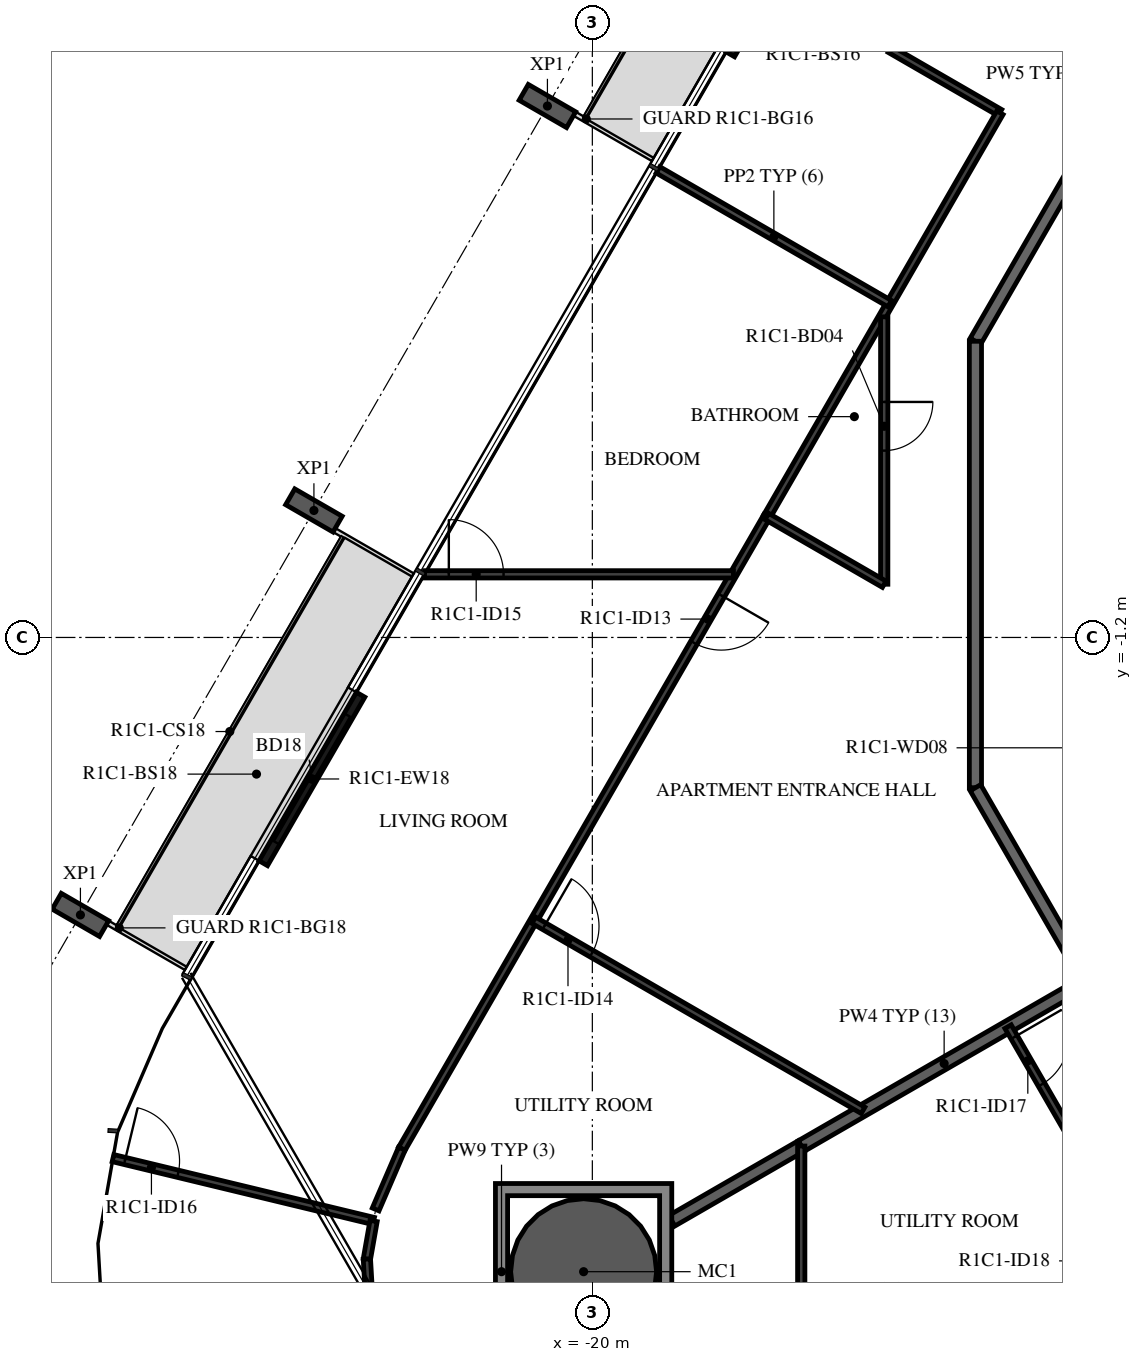
"""IFC4 building model, lengths in metres.
Left out: names, types, materials, properties, quantities, classifications, styles, units other than length and angle.
Written with IfcOpenShell. Run it as: python <this file> out.ifc"""

import sys

from ifc_helpers import new_model, si_unit, direction, frame, frame_2d, origin, origin_2d, place, context, subcontext, project, spatial, polyline, rectangle, hollow_circle, i_section, outline, extrude, element, fill, save


model = new_model("IFC4")
c1 = context("Model", 3, precision=1e-05, world=origin(), true_north=direction((0.0, 1.0)))
c2 = subcontext(c1, "Body", "Model", "MODEL_VIEW")
j1 = project(units=[si_unit("LENGTHUNIT", "METRE"), si_unit("PLANEANGLEUNIT", "RADIAN")], contexts=[c1])
p1 = place(None, origin())
s1 = spatial("IfcSite", under=j1, at=p1, CompositionType="ELEMENT")
p2 = place(p1, origin())
s2 = spatial("IfcBuilding", under=s1, at=p2, CompositionType="ELEMENT")
p3 = place(p2, frame((0.0, 0.0, 62.9)))
s3 = spatial("IfcBuildingStorey", under=s2, at=p3, CompositionType="ELEMENT", Elevation=62.9)
p4 = place(p3, frame((-20.144, -11.63, -0.38), z_axis=(0.0, 0.0, 1.0), x_axis=(1.0, 0.0, 0.0)))
e1 = element("IfcColumn", 1, at=p4, inside=s3, PredefinedType="COLUMN", context=c2, shape_type="SweptSolid", body=[
    extrude(hollow_circle(Radius=1.2, WallThickness=0.06, at=origin_2d()), origin(), (0.0, 0.0, 1.0), 3.5),
])
for number, where, z_axis, x_axis in (
    (2, (-20.739, 7.539, -0.38), (0.0, 0.0, 1.0), (0.5, 0.866, 0.0)),
    (3, (-24.579, 0.888, -0.38), (0.0, 0.0, 1.0), (0.5, 0.866, 0.0)),
    (4, (-28.419, -5.763, -0.38), (0.0, 0.0, 1.0), (0.5, 0.866, 0.0)),
):
    element("IfcColumn", number, at=place(p3, frame(where, z_axis=z_axis, x_axis=x_axis)), inside=s3, PredefinedType="COLUMN", context=c2, shape_type="SweptSolid", body=[
        extrude(i_section(OverallWidth=0.3, OverallDepth=0.9, WebThickness=0.019, FlangeThickness=0.035, FilletRadius=0.03, at=origin_2d()), origin(), (0.0, 0.0, 1.0), 3.5),
    ])
p5 = place(p3, frame((-16.131, 11.161, 0.0), z_axis=(0.0, 0.0, 1.0), x_axis=(-0.500028443584, -0.866008981251, 0.0)))
e5 = element("IfcWall", 5, at=p5, inside=s3, PredefinedType="STANDARD", context=c2, shape_type="SweptSolid", body=[
    extrude(rectangle(XDim=3.2, YDim=0.16, at=frame_2d((1.6, 0.0))), origin(), (0.0, 0.0, 1.0), 3.12),
])
p6 = place(p5, frame((0.4, 0.0, 0.0)))
e6 = element("IfcOpeningElement", 6, at=p6, cuts=e5, PredefinedType="OPENING", context=c2, shape_type="SweptSolid", body=[
    extrude(rectangle(XDim=2.4, YDim=2.4, at=frame_2d((1.2, 1.2))), frame((0.0, 0.09, 0.0), z_axis=(0.0, -1.0, 0.0), x_axis=(1.0, 0.0, 0.0)), (0.0, 0.0, 1.0), 0.18),
])
p7 = place(p3, frame((-23.811, -2.142, 0.0), z_axis=(0.0, 0.0, 1.0), x_axis=(-0.500028443584, -0.866008981251, 0.0)))
e7 = element("IfcWall", 7, at=p7, inside=s3, PredefinedType="STANDARD", context=c2, shape_type="SweptSolid", body=[
    extrude(rectangle(XDim=3.2, YDim=0.16, at=frame_2d((1.6, 0.0))), origin(), (0.0, 0.0, 1.0), 3.12),
])
p8 = place(p7, frame((0.4, 0.0, 0.0)))
e8 = element("IfcOpeningElement", 8, at=p8, cuts=e7, PredefinedType="OPENING", context=c2, shape_type="SweptSolid", body=[
    extrude(rectangle(XDim=2.4, YDim=2.4, at=frame_2d((1.2, 1.2))), frame((0.0, 0.09, 0.0), z_axis=(0.0, -1.0, 0.0), x_axis=(1.0, 0.0, 0.0)), (0.0, 0.0, 1.0), 0.18),
])
p9 = place(p3, frame((-10.029, 10.029, 0.0), z_axis=(0.0, 0.0, 1.0), x_axis=(-0.500001669485, -0.866024439905, 0.0)))
e9 = element("IfcWall", 9, at=p9, inside=s3, PredefinedType="STANDARD", context=c2, shape_type="SweptSolid", body=[
    extrude(rectangle(XDim=7.342, YDim=0.2, at=frame_2d((3.671, 0.0))), origin(), (0.0, 0.0, 1.0), 3.12),
])
p10 = place(p9, frame((0.2, 0.0, 0.0)))
e10 = element("IfcOpeningElement", 10, at=p10, cuts=e9, PredefinedType="OPENING", context=c2, shape_type="SweptSolid", body=[
    extrude(rectangle(XDim=1.0, YDim=2.1, at=frame_2d((0.5, 1.05))), frame((0.0, 0.11, 0.0), z_axis=(0.0, -1.0, 0.0), x_axis=(1.0, 0.0, 0.0)), (0.0, 0.0, 1.0), 0.22),
])
for number, where, z_axis, x_axis in (
    (11, (-13.7, 3.671, 0.0), (0.0, 0.0, 1.0), (0.0, -1.0, 0.0)),
    (12, (-13.7, -3.671, 0.0), (0.0, 0.0, 1.0), (0.5, -0.866, 0.0)),
):
    element("IfcWall", number, at=place(p3, frame(where, z_axis=z_axis, x_axis=x_axis)), inside=s3, PredefinedType="STANDARD", context=c2, shape_type="SweptSolid", body=[
        extrude(rectangle(XDim=7.342, YDim=0.2, at=frame_2d((3.671, 0.0))), origin(), (0.0, 0.0, 1.0), 3.12),
    ])
p11 = place(p3, frame((-16.565, -9.564, 0.0), z_axis=(0.0, 0.0, 1.0), x_axis=(0.866028274568, 0.499995027624, 0.0)))
e13 = element("IfcWall", 13, at=p11, inside=s3, PredefinedType="STANDARD", context=c2, shape_type="SweptSolid", body=[
    extrude(rectangle(XDim=5.427, YDim=0.2, at=frame_2d((2.714, 0.0))), origin(), (0.0, 0.0, 1.0), 3.12),
])
p12 = place(p3, frame((-18.694, -10.793, 0.0), z_axis=(0.0, 0.0, 1.0), x_axis=(0.866046662726, 0.499963176624, 0.0)))
e14 = element("IfcWall", 14, at=p12, inside=s3, PredefinedType="STANDARD", context=c2, shape_type="SweptSolid", body=[
    extrude(rectangle(XDim=2.458, YDim=0.2, at=frame_2d((1.229, 0.0))), origin(), (0.0, 0.0, 1.0), 3.12),
])
p13 = place(p3, frame((-15.106, 8.474, 0.0), z_axis=(0.0, 0.0, 1.0), x_axis=(0.866041603473, -0.499971940267, 0.0)))
e15 = element("IfcWall", 15, at=p13, inside=s3, PredefinedType="PARTITIONING", context=c2, shape_type="SweptSolid", body=[
    extrude(rectangle(XDim=2.089, YDim=0.12, at=frame_2d((1.045, 0.0))), origin(), (0.0, 0.0, 1.0), 3.12),
])
p14 = place(p3, frame((-13.297, 7.429, 0.0), z_axis=(0.0, 0.0, 1.0), x_axis=(-0.49999903102, -0.866025963225, 0.0)))
e16 = element("IfcWall", 16, at=p14, inside=s3, PredefinedType="PARTITIONING", context=c2, shape_type="SweptSolid", body=[
    extrude(rectangle(XDim=7.667, YDim=0.12, at=frame_2d((3.833, 0.0))), origin(), (0.0, 0.0, 1.0), 3.12),
])
p15 = place(p3, frame((-17.13, 0.79, 0.0), z_axis=(0.0, 0.0, 1.0), x_axis=(-0.499997052475, -0.866027105532, 0.0)))
e17 = element("IfcWall", 17, at=p15, inside=s3, PredefinedType="PARTITIONING", context=c2, shape_type="SweptSolid", body=[
    extrude(rectangle(XDim=12.006, YDim=0.12, at=frame_2d((6.003, 0.0))), origin(), (0.0, 0.0, 1.0), 3.12),
])
p16 = place(p15, frame((1.498, 0.0, 0.0)))
e18 = element("IfcOpeningElement", 18, at=p16, cuts=e17, PredefinedType="OPENING", context=c2, shape_type="SweptSolid", body=[
    extrude(rectangle(XDim=0.9, YDim=2.1, at=frame_2d((0.45, 1.05))), frame((0.0, 0.07, 0.0), z_axis=(0.0, -1.0, 0.0), x_axis=(1.0, 0.0, 0.0)), (0.0, 0.0, 1.0), 0.14),
])
p17 = place(p3, frame((-15.2, 4.073, 0.0), z_axis=(0.0, 0.0, 1.0), x_axis=(0.0, -1.0, 0.0)))
e19 = element("IfcWall", 19, at=p17, inside=s3, PredefinedType="PARTITIONING", context=c2, shape_type="SweptSolid", body=[
    extrude(rectangle(XDim=4.398, YDim=0.12, at=frame_2d((2.199, 0.0))), origin(), (0.0, 0.0, 1.0), 3.12),
])
p18 = place(p17, frame((1.4, 0.0, 0.0)))
e20 = element("IfcOpeningElement", 20, at=p18, cuts=e19, PredefinedType="OPENING", context=c2, shape_type="SweptSolid", body=[
    extrude(rectangle(XDim=0.8, YDim=2.1, at=frame_2d((0.4, 1.05))), frame((0.0, 0.07, 0.0), z_axis=(0.0, -1.0, 0.0), x_axis=(1.0, 0.0, 0.0)), (0.0, 0.0, 1.0), 0.14),
])
p19 = place(p3, frame((-15.2, -0.325, 0.0), z_axis=(0.0, 0.0, 1.0), x_axis=(-0.866003168561, 0.500038510559, 0.0)))
e21 = element("IfcWall", 21, at=p19, inside=s3, PredefinedType="PARTITIONING", context=c2, shape_type="SweptSolid", body=[
    extrude(rectangle(XDim=2.229, YDim=0.12, at=frame_2d((1.114, 0.0))), origin(), (0.0, 0.0, 1.0), 3.12),
])
p20 = place(p3, frame((-20.963, -5.85, 0.0), z_axis=(0.0, 0.0, 1.0), x_axis=(0.866021746608, -0.500006334362, 0.0)))
e22 = element("IfcWall", 22, at=p20, inside=s3, PredefinedType="PARTITIONING", context=c2, shape_type="SweptSolid", body=[
    extrude(rectangle(XDim=6.253, YDim=0.12, at=frame_2d((3.127, 0.0))), origin(), (0.0, 0.0, 1.0), 3.12),
])
p21 = place(p20, frame((0.2, 0.0, 0.0)))
e23 = element("IfcOpeningElement", 23, at=p21, cuts=e22, PredefinedType="OPENING", context=c2, shape_type="SweptSolid", body=[
    extrude(rectangle(XDim=0.9, YDim=2.1, at=frame_2d((0.45, 1.05))), frame((0.0, 0.07, 0.0), z_axis=(0.0, -1.0, 0.0), x_axis=(1.0, 0.0, 0.0)), (0.0, 0.0, 1.0), 0.14),
])
p22 = place(p3, frame((-18.92, 6.49, 0.0), z_axis=(0.0, 0.0, 1.0), x_axis=(0.865994303029, -0.500053864221, 0.0)))
e24 = element("IfcWall", 24, at=p22, inside=s3, PredefinedType="PARTITIONING", context=c2, shape_type="SweptSolid", body=[
    extrude(rectangle(XDim=4.4, YDim=0.12, at=frame_2d((2.2, 0.0))), origin(), (0.0, 0.0, 1.0), 2.73),
])
p23 = place(p3, frame((-22.76, -0.162, 0.0), z_axis=(0.0, 0.0, 1.0), x_axis=(1.0, 0.0, 0.0)))
e25 = element("IfcWall", 25, at=p23, inside=s3, PredefinedType="PARTITIONING", context=c2, shape_type="SweptSolid", body=[
    extrude(rectangle(XDim=5.081, YDim=0.12, at=frame_2d((2.54, 0.0))), origin(), (0.0, 0.0, 1.0), 3.12),
])
p24 = place(p23, frame((0.4, 0.0, 0.0)))
e26 = element("IfcOpeningElement", 26, at=p24, cuts=e25, PredefinedType="OPENING", context=c2, shape_type="SweptSolid", body=[
    extrude(rectangle(XDim=0.9, YDim=2.1, at=frame_2d((0.45, 1.05))), frame((0.0, 0.07, 0.0), z_axis=(0.0, -1.0, 0.0), x_axis=(1.0, 0.0, 0.0)), (0.0, 0.0, 1.0), 0.14),
])
p25 = place(p3, frame((-23.564, -10.606, 0.0), z_axis=(0.0, 0.0, 1.0), x_axis=(0.396195073027, 0.918166359713, 0.0)))
e27 = element("IfcWall", 27, at=p25, inside=s3, PredefinedType="PARTITIONING", context=c2, shape_type="SweptSolid", body=[
    extrude(rectangle(XDim=1.087, YDim=0.12, at=frame_2d((0.543, 0.0))), origin(), (0.0, 0.0, 1.0), 3.12),
])
p26 = place(p3, frame((-27.883, -9.762, 0.0), z_axis=(0.0, 0.0, 1.0), x_axis=(0.972097015458, -0.234579181809, 0.0)))
e28 = element("IfcWall", 28, at=p26, inside=s3, PredefinedType="PARTITIONING", context=c2, shape_type="SweptSolid", body=[
    extrude(rectangle(XDim=4.409, YDim=0.12, at=frame_2d((2.204, 0.0))), origin(), (0.0, 0.0, 1.0), 3.12),
])
p27 = place(p26, frame((0.2, 0.0, 0.0)))
e29 = element("IfcOpeningElement", 29, at=p27, cuts=e28, PredefinedType="OPENING", context=c2, shape_type="SweptSolid", body=[
    extrude(rectangle(XDim=0.9, YDim=2.1, at=frame_2d((0.45, 1.05))), frame((0.0, 0.07, 0.0), z_axis=(0.0, -1.0, 0.0), x_axis=(1.0, 0.0, 0.0)), (0.0, 0.0, 1.0), 0.14),
])
p28 = place(p3, frame((-23.597, -10.796, 0.0), z_axis=(0.0, 0.0, 1.0), x_axis=(-0.173610040386, -0.984814476882, 0.0)))
e30 = element("IfcWall", 30, at=p28, inside=s3, PredefinedType="PARTITIONING", context=c2, shape_type="SweptSolid", body=[
    extrude(rectangle(XDim=0.636, YDim=0.12, at=frame_2d((0.318, 0.0))), origin(), (0.0, 0.0, 1.0), 3.12),
])
p29 = place(p3, frame((-23.708, -11.422, 0.0), z_axis=(0.0, 0.0, 1.0), x_axis=(0.058031280246, -0.998314765248, 0.0)))
e31 = element("IfcWall", 31, at=p29, inside=s3, PredefinedType="PARTITIONING", context=c2, shape_type="SweptSolid", body=[
    extrude(rectangle(XDim=0.829, YDim=0.12, at=frame_2d((0.415, 0.0))), origin(), (0.0, 0.0, 1.0), 3.12),
])
p30 = place(p3, frame((-13.164, -7.6, 0.0), z_axis=(0.0, 0.0, 1.0), x_axis=(0.500000928893, -0.866024867487, 0.0)))
e32 = element("IfcWall", 32, at=p30, inside=s3, PredefinedType="PARTITIONING", context=c2, shape_type="SweptSolid", body=[
    extrude(rectangle(XDim=4.073, YDim=0.12, at=frame_2d((2.036, 0.0))), origin(), (0.0, 0.0, 1.0), 3.12),
])
p31 = place(p30, frame((0.2, 0.0, 0.0)))
e33 = element("IfcOpeningElement", 33, at=p31, cuts=e32, PredefinedType="OPENING", context=c2, shape_type="SweptSolid", body=[
    extrude(rectangle(XDim=0.9, YDim=2.1, at=frame_2d((0.45, 1.05))), frame((0.0, 0.07, 0.0), z_axis=(0.0, -1.0, 0.0), x_axis=(1.0, 0.0, 0.0)), (0.0, 0.0, 1.0), 0.14),
])
p32 = place(p3, frame((-16.565, -13.63, 0.0), z_axis=(0.0, 0.0, 1.0), x_axis=(0.0, 1.0, 0.0)))
e34 = element("IfcWall", 34, at=p32, inside=s3, PredefinedType="PARTITIONING", context=c2, shape_type="SweptSolid", body=[
    extrude(rectangle(XDim=4.066, YDim=0.12, at=frame_2d((2.033, 0.0))), origin(), (0.0, 0.0, 1.0), 3.12),
])
p33 = place(p32, frame((0.2, 0.0, 0.0)))
e35 = element("IfcOpeningElement", 35, at=p33, cuts=e34, PredefinedType="OPENING", context=c2, shape_type="SweptSolid", body=[
    extrude(rectangle(XDim=0.8, YDim=2.1, at=frame_2d((0.4, 1.05))), frame((0.0, 0.07, 0.0), z_axis=(0.0, -1.0, 0.0), x_axis=(1.0, 0.0, 0.0)), (0.0, 0.0, 1.0), 0.14),
])
p34 = place(p3, origin())
e36 = element("IfcWall", 36, at=p34, inside=s3, PredefinedType="STANDARD", context=c2, shape_type="SweptSolid", body=[
    extrude(outline(polyline([(-18.694, -10.18), (-18.694, -13.08), (-21.594, -13.08), (-21.594, -10.18), (-18.694, -10.18)]), holes=[polyline([(-21.394, -12.88), (-18.894, -12.88), (-18.894, -10.38), (-21.394, -10.38), (-21.394, -12.88)])]), origin(), (0.0, 0.0, 1.0), 3.12),
])
p35 = place(p8, origin())
e37 = element("IfcDoor", 37, at=p35, inside=s3, OperationType="DOUBLE_DOOR_SLIDING", PredefinedType="DOOR", context=c2, shape_type="SweptSolid", body=[
    extrude(rectangle(XDim=2.4, YDim=2.4, at=frame_2d((1.2, 1.2))), frame((0.0, 0.025, 0.0), z_axis=(0.0, -1.0, 0.0), x_axis=(1.0, 0.0, 0.0)), (0.0, 0.0, 1.0), 0.05),
])
fill(e8, e37)
p36 = place(p18, origin())
e38 = element("IfcDoor", 38, at=p36, inside=s3, OperationType="SINGLE_SWING_RIGHT", PredefinedType="DOOR", context=c2, shape_type="SweptSolid", body=[
    extrude(rectangle(XDim=0.8, YDim=2.1, at=frame_2d((0.4, 1.05))), frame((0.0, 0.025, 0.0), z_axis=(0.0, -1.0, 0.0), x_axis=(1.0, 0.0, 0.0)), (0.0, 0.0, 1.0), 0.05),
])
fill(e20, e38)
p37 = place(p16, origin())
e39 = element("IfcDoor", 39, at=p37, inside=s3, OperationType="SINGLE_SWING_RIGHT", PredefinedType="DOOR", context=c2, shape_type="SweptSolid", body=[
    extrude(rectangle(XDim=0.9, YDim=2.1, at=frame_2d((0.45, 1.05))), frame((0.0, 0.025, 0.0), z_axis=(0.0, -1.0, 0.0), x_axis=(1.0, 0.0, 0.0)), (0.0, 0.0, 1.0), 0.05),
])
fill(e18, e39)
p38 = place(p21, origin())
e40 = element("IfcDoor", 40, at=p38, inside=s3, OperationType="SINGLE_SWING_RIGHT", PredefinedType="DOOR", context=c2, shape_type="SweptSolid", body=[
    extrude(rectangle(XDim=0.9, YDim=2.1, at=frame_2d((0.45, 1.05))), frame((0.0, 0.025, 0.0), z_axis=(0.0, -1.0, 0.0), x_axis=(1.0, 0.0, 0.0)), (0.0, 0.0, 1.0), 0.05),
])
fill(e23, e40)
p39 = place(p24, origin())
e41 = element("IfcDoor", 41, at=p39, inside=s3, OperationType="SINGLE_SWING_LEFT", PredefinedType="DOOR", context=c2, shape_type="SweptSolid", body=[
    extrude(rectangle(XDim=0.9, YDim=2.1, at=frame_2d((0.45, 1.05))), frame((0.0, 0.025, 0.0), z_axis=(0.0, -1.0, 0.0), x_axis=(1.0, 0.0, 0.0)), (0.0, 0.0, 1.0), 0.05),
])
fill(e26, e41)
p40 = place(p27, origin())
e42 = element("IfcDoor", 42, at=p40, inside=s3, OperationType="SINGLE_SWING_RIGHT", PredefinedType="DOOR", context=c2, shape_type="SweptSolid", body=[
    extrude(rectangle(XDim=0.9, YDim=2.1, at=frame_2d((0.45, 1.05))), frame((0.0, 0.025, 0.0), z_axis=(0.0, -1.0, 0.0), x_axis=(1.0, 0.0, 0.0)), (0.0, 0.0, 1.0), 0.05),
])
fill(e29, e42)
p41 = place(p31, origin())
e43 = element("IfcDoor", 43, at=p41, inside=s3, OperationType="SINGLE_SWING_LEFT", PredefinedType="DOOR", context=c2, shape_type="SweptSolid", body=[
    extrude(rectangle(XDim=0.9, YDim=2.1, at=frame_2d((0.45, 1.05))), frame((0.0, 0.025, 0.0), z_axis=(0.0, -1.0, 0.0), x_axis=(1.0, 0.0, 0.0)), (0.0, 0.0, 1.0), 0.05),
])
fill(e33, e43)
save(model, sys.argv[1])
